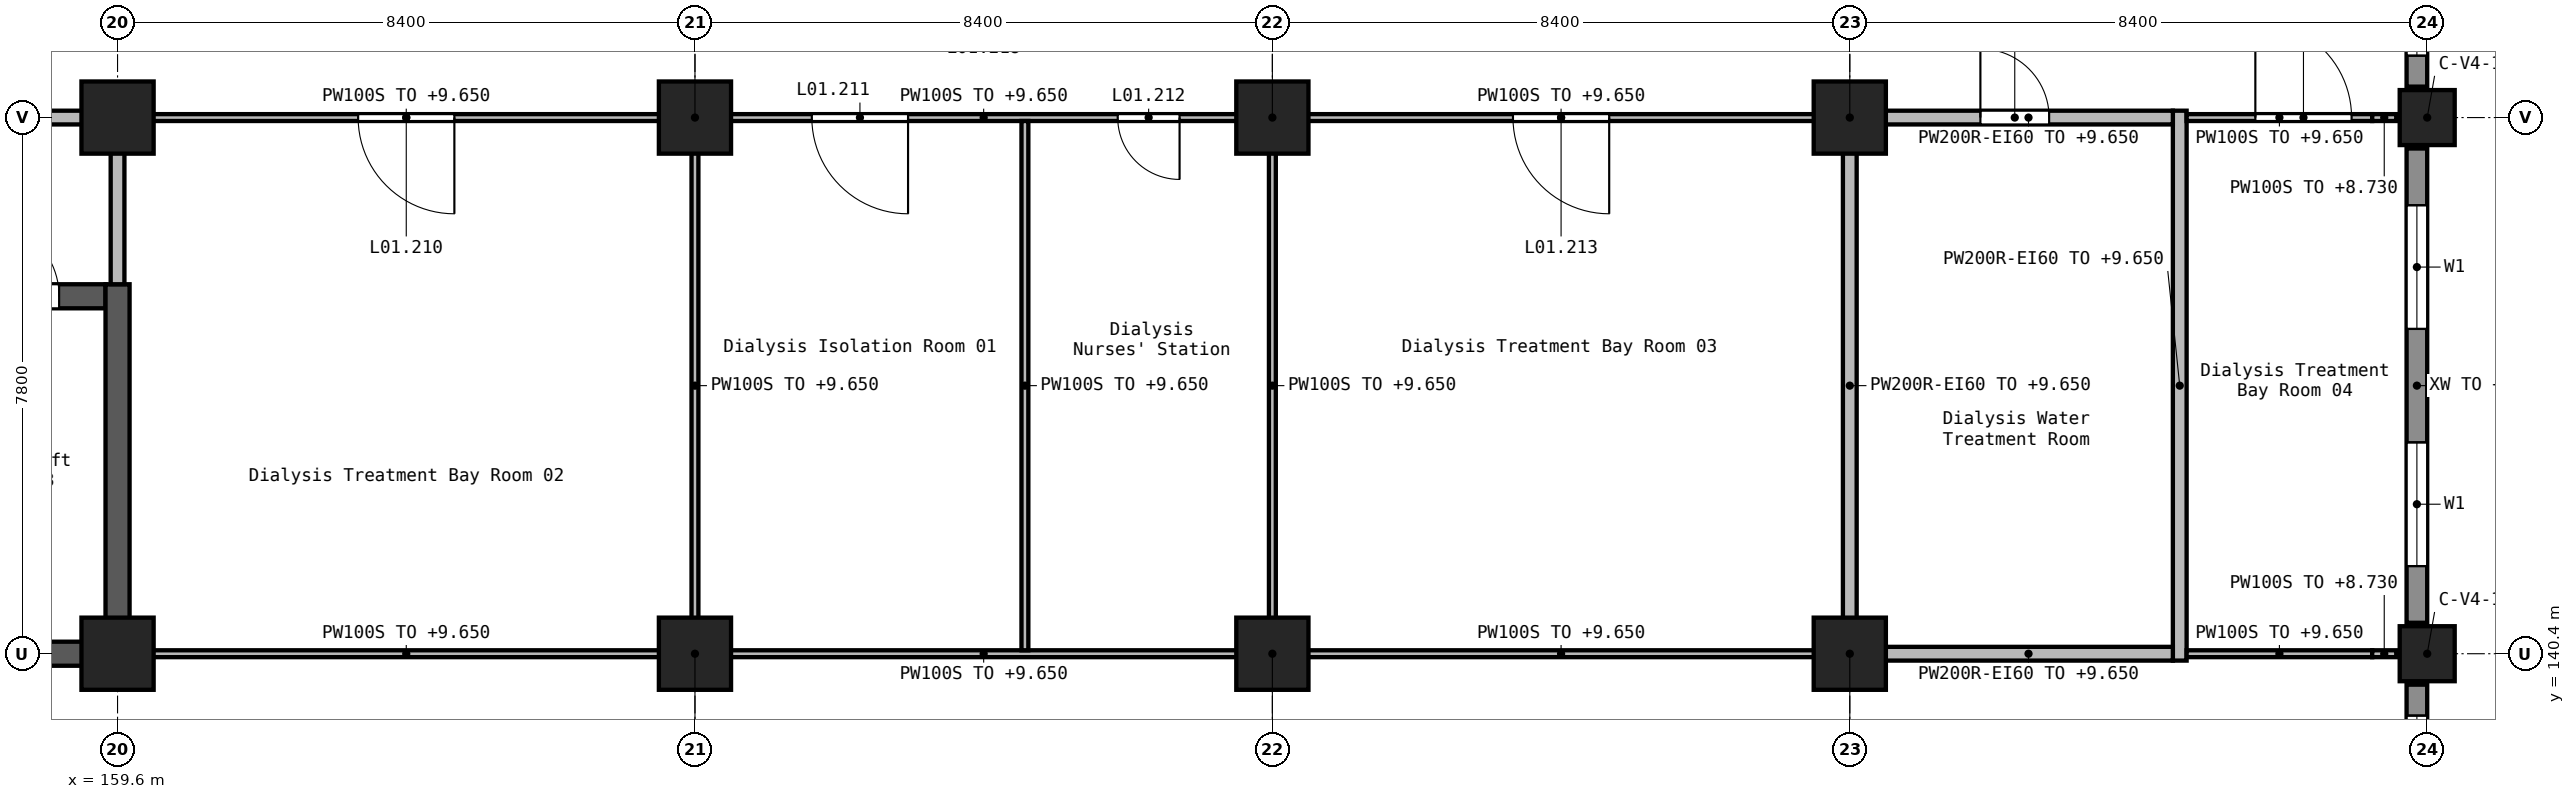
"""IFC4 building model, lengths in metres.
Left out: names, types, materials, properties, quantities, classifications, styles, units other than length and angle.
Written with IfcOpenShell. Run it as: python <this file> out.ifc"""

import sys

from ifc_helpers import new_model, si_unit, direction, frame, frame_2d, origin, origin_2d, place, context, subcontext, project, spatial, rectangle, extrude, element, fill, save


model = new_model("IFC4")
c1 = context("Model", 3, precision=1e-05, world=origin(), true_north=direction((0.0, 1.0)))
c2 = subcontext(c1, "Body", "Model", "MODEL_VIEW")
j1 = project(units=[si_unit("LENGTHUNIT", "METRE"), si_unit("PLANEANGLEUNIT", "RADIAN")], contexts=[c1])
p1 = place(None, origin())
s1 = spatial("IfcSite", under=j1, at=p1, CompositionType="ELEMENT")
p2 = place(p1, origin())
s2 = spatial("IfcBuilding", under=s1, at=p2, CompositionType="ELEMENT")
p3 = place(p2, frame((0.0, 0.0, 5.4)))
s3 = spatial("IfcBuildingStorey", under=s2, at=p3, CompositionType="ELEMENT", Elevation=5.4)
for number, where, z_axis, x_axis in (
    (1, (159.6, 140.4, 0.0), (0.0, 0.0, 1.0), (1.0, 0.0, 0.0)),
    (2, (159.6, 148.2, 0.0), (0.0, 0.0, 1.0), (1.0, 0.0, 0.0)),
    (3, (168.0, 140.4, 0.0), (0.0, 0.0, 1.0), (1.0, 0.0, 0.0)),
    (4, (168.0, 148.2, 0.0), (0.0, 0.0, 1.0), (1.0, 0.0, 0.0)),
    (5, (176.4, 140.4, 0.0), (0.0, 0.0, 1.0), (1.0, 0.0, 0.0)),
    (6, (176.4, 148.2, 0.0), (0.0, 0.0, 1.0), (1.0, 0.0, 0.0)),
    (7, (184.8, 140.4, 0.0), (0.0, 0.0, 1.0), (1.0, 0.0, 0.0)),
    (8, (184.8, 148.2, 0.0), (0.0, 0.0, 1.0), (1.0, 0.0, 0.0)),
):
    element("IfcColumn", number, at=place(p3, frame(where, z_axis=z_axis, x_axis=x_axis)), inside=s3, PredefinedType="COLUMN", context=c2, shape_type="SweptSolid", body=[
        extrude(rectangle(XDim=1.05, YDim=1.05, at=origin_2d()), origin(), (0.0, 0.0, 1.0), 4.5),
    ])
for number, where, z_axis, x_axis in (
    (9, (193.2, 140.4, 0.0), (0.0, 0.0, 1.0), (1.0, 0.0, 0.0)),
    (10, (193.2, 148.2, 0.0), (0.0, 0.0, 1.0), (1.0, 0.0, 0.0)),
):
    element("IfcColumn", number, at=place(p3, frame(where, z_axis=z_axis, x_axis=x_axis)), inside=s3, PredefinedType="COLUMN", context=c2, shape_type="SweptSolid", body=[
        extrude(rectangle(XDim=0.8, YDim=0.8, at=origin_2d()), origin(), (0.0, 0.0, 1.0), 4.5),
    ])
p4 = place(p3, frame((156.8, 140.4, 0.0), z_axis=(0.0, 0.0, 1.0), x_axis=(1.0, 0.0, 0.0)))
e11 = element("IfcWall", 11, at=p4, inside=s3, PredefinedType="SHEAR", context=c2, shape_type="SweptSolid", body=[
    extrude(rectangle(XDim=2.625, YDim=0.35, at=frame_2d((1.312, 0.0))), origin(), (0.0, 0.0, 1.0), 4.5),
])
p5 = place(p3, frame((156.8, 145.6, 0.0), z_axis=(0.0, 0.0, 1.0), x_axis=(1.0, 0.0, 0.0)))
e12 = element("IfcWall", 12, at=p5, inside=s3, PredefinedType="SHEAR", context=c2, shape_type="SweptSolid", body=[
    extrude(rectangle(XDim=2.625, YDim=0.35, at=frame_2d((1.312, 0.0))), origin(), (0.0, 0.0, 1.0), 4.5),
])
p6 = place(p5, frame((0.85, 0.0, 0.0)))
e13 = element("IfcOpeningElement", 13, at=p6, cuts=e12, PredefinedType="OPENING", context=c2, shape_type="SweptSolid", body=[
    extrude(rectangle(XDim=1.1, YDim=2.1, at=frame_2d((0.55, 1.05))), frame((0.0, 0.185, 0.0), z_axis=(0.0, -1.0, 0.0), x_axis=(1.0, 0.0, 0.0)), (0.0, 0.0, 1.0), 0.37),
])
p7 = place(p3, frame((159.6, 140.225, 0.0), z_axis=(0.0, 0.0, 1.0), x_axis=(0.0, 1.0, 0.0)))
e14 = element("IfcWall", 14, at=p7, inside=s3, PredefinedType="SHEAR", context=c2, shape_type="SweptSolid", body=[
    extrude(rectangle(XDim=5.55, YDim=0.35, at=frame_2d((2.775, 0.0))), origin(), (0.0, 0.0, 1.0), 4.5),
])
p8 = place(p3, frame((193.05, 137.25, 0.0), z_axis=(0.0, 0.0, 1.0), x_axis=(0.0, 1.0, 0.0)))
e15 = element("IfcWall", 15, at=p8, inside=s3, PredefinedType="STANDARD", context=c2, shape_type="SweptSolid", body=[
    extrude(rectangle(XDim=2.7, YDim=0.3, at=frame_2d((1.35, 0.0))), origin(), (0.0, 0.0, 1.0), 3.35),
])
p9 = place(p8, frame((0.45, 0.0, 0.9)))
e16 = element("IfcOpeningElement", 16, at=p9, cuts=e15, PredefinedType="OPENING", context=c2, shape_type="SweptSolid", body=[
    extrude(rectangle(XDim=1.8, YDim=1.5, at=frame_2d((0.9, 0.75))), frame((0.0, 0.16, 0.0), z_axis=(0.0, -1.0, 0.0), x_axis=(1.0, 0.0, 0.0)), (0.0, 0.0, 1.0), 0.32),
])
p10 = place(p3, frame((193.05, 140.85, 0.0), z_axis=(0.0, 0.0, 1.0), x_axis=(0.0, 1.0, 0.0)))
e17 = element("IfcWall", 17, at=p10, inside=s3, PredefinedType="STANDARD", context=c2, shape_type="SweptSolid", body=[
    extrude(rectangle(XDim=6.9, YDim=0.3, at=frame_2d((3.45, 0.0))), origin(), (0.0, 0.0, 1.0), 3.35),
])
p11 = place(p10, frame((0.825, 0.0, 0.9)))
e18 = element("IfcOpeningElement", 18, at=p11, cuts=e17, PredefinedType="OPENING", context=c2, shape_type="SweptSolid", body=[
    extrude(rectangle(XDim=1.8, YDim=1.5, at=frame_2d((0.9, 0.75))), frame((0.0, 0.16, 0.0), z_axis=(0.0, -1.0, 0.0), x_axis=(1.0, 0.0, 0.0)), (0.0, 0.0, 1.0), 0.32),
])
p12 = place(p10, frame((4.275, 0.0, 0.9)))
e19 = element("IfcOpeningElement", 19, at=p12, cuts=e17, PredefinedType="OPENING", context=c2, shape_type="SweptSolid", body=[
    extrude(rectangle(XDim=1.8, YDim=1.5, at=frame_2d((0.9, 0.75))), frame((0.0, 0.16, 0.0), z_axis=(0.0, -1.0, 0.0), x_axis=(1.0, 0.0, 0.0)), (0.0, 0.0, 1.0), 0.32),
])
p13 = place(p3, frame((193.05, 148.65, 0.0), z_axis=(0.0, 0.0, 1.0), x_axis=(0.0, 1.0, 0.0)))
e20 = element("IfcWall", 20, at=p13, inside=s3, PredefinedType="STANDARD", context=c2, shape_type="SweptSolid", body=[
    extrude(rectangle(XDim=2.7, YDim=0.3, at=frame_2d((1.35, 0.0))), origin(), (0.0, 0.0, 1.0), 3.35),
])
p14 = place(p13, frame((0.45, 0.0, 0.9)))
e21 = element("IfcOpeningElement", 21, at=p14, cuts=e20, PredefinedType="OPENING", context=c2, shape_type="SweptSolid", body=[
    extrude(rectangle(XDim=1.8, YDim=1.5, at=frame_2d((0.9, 0.75))), frame((0.0, 0.16, 0.0), z_axis=(0.0, -1.0, 0.0), x_axis=(1.0, 0.0, 0.0)), (0.0, 0.0, 1.0), 0.32),
])
p15 = place(p3, frame((151.7, 148.2, 0.0), z_axis=(0.0, 0.0, 1.0), x_axis=(1.0, 0.0, 0.0)))
e22 = element("IfcWall", 22, at=p15, inside=s3, PredefinedType="SOLIDWALL", context=c2, shape_type="SweptSolid", body=[
    extrude(rectangle(XDim=7.4, YDim=0.2, at=frame_2d((3.7, 0.0))), origin(), (0.0, 0.0, 1.0), 4.25),
])
p16 = place(p15, frame((2.8, 0.0, 0.0)))
e23 = element("IfcOpeningElement", 23, at=p16, cuts=e22, PredefinedType="OPENING", context=c2, shape_type="SweptSolid", body=[
    extrude(rectangle(XDim=1.8, YDim=2.1, at=frame_2d((0.9, 1.05))), frame((0.0, 0.11, 0.0), z_axis=(0.0, -1.0, 0.0), x_axis=(1.0, 0.0, 0.0)), (0.0, 0.0, 1.0), 0.22),
])
p17 = place(p3, frame((184.8, 140.9, 0.0), z_axis=(0.0, 0.0, 1.0), x_axis=(0.0, 1.0, 0.0)))
e24 = element("IfcWall", 24, at=p17, inside=s3, PredefinedType="SOLIDWALL", context=c2, shape_type="SweptSolid", body=[
    extrude(rectangle(XDim=6.8, YDim=0.2, at=frame_2d((3.4, 0.0))), origin(), (0.0, 0.0, 1.0), 4.25),
])
p18 = place(p3, frame((189.6, 140.3, 0.0), z_axis=(0.0, 0.0, 1.0), x_axis=(0.0, 1.0, 0.0)))
e25 = element("IfcWall", 25, at=p18, inside=s3, PredefinedType="SOLIDWALL", context=c2, shape_type="SweptSolid", body=[
    extrude(rectangle(XDim=8.0, YDim=0.2, at=frame_2d((4.0, 0.0))), origin(), (0.0, 0.0, 1.0), 4.25),
])
p19 = place(p3, frame((185.3, 140.4, 0.0), z_axis=(0.0, 0.0, 1.0), x_axis=(1.0, 0.0, 0.0)))
e26 = element("IfcWall", 26, at=p19, inside=s3, PredefinedType="SOLIDWALL", context=c2, shape_type="SweptSolid", body=[
    extrude(rectangle(XDim=4.2, YDim=0.2, at=frame_2d((2.1, 0.0))), origin(), (0.0, 0.0, 1.0), 4.25),
])
p20 = place(p3, frame((185.3, 148.2, 0.0), z_axis=(0.0, 0.0, 1.0), x_axis=(1.0, 0.0, 0.0)))
e27 = element("IfcWall", 27, at=p20, inside=s3, PredefinedType="SOLIDWALL", context=c2, shape_type="SweptSolid", body=[
    extrude(rectangle(XDim=4.2, YDim=0.2, at=frame_2d((2.1, 0.0))), origin(), (0.0, 0.0, 1.0), 4.25),
])
p21 = place(p20, frame((1.4, 0.0, 0.0)))
e28 = element("IfcOpeningElement", 28, at=p21, cuts=e27, PredefinedType="OPENING", context=c2, shape_type="SweptSolid", body=[
    extrude(rectangle(XDim=1.0, YDim=2.1, at=frame_2d((0.5, 1.05))), frame((0.0, 0.11, 0.0), z_axis=(0.0, -1.0, 0.0), x_axis=(1.0, 0.0, 0.0)), (0.0, 0.0, 1.0), 0.22),
])
p22 = place(p3, frame((159.6, 145.775, 0.0), z_axis=(0.0, 0.0, 1.0), x_axis=(0.0, 1.0, 0.0)))
e29 = element("IfcWall", 29, at=p22, inside=s3, PredefinedType="SOLIDWALL", context=c2, shape_type="SweptSolid", body=[
    extrude(rectangle(XDim=1.925, YDim=0.2, at=frame_2d((0.962, 0.0))), origin(), (0.0, 0.0, 1.0), 4.25),
])
p23 = place(p3, frame((184.3, 140.4, 0.0), z_axis=(0.0, 0.0, 1.0), x_axis=(-1.0, 0.0, 0.0)))
e30 = element("IfcWall", 30, at=p23, inside=s3, PredefinedType="PARTITIONING", context=c2, shape_type="SweptSolid", body=[
    extrude(rectangle(XDim=7.4, YDim=0.1, at=frame_2d((3.7, 0.0))), origin(), (0.0, 0.0, 1.0), 4.25),
])
for number, where, z_axis, x_axis in (
    (31, (175.9, 140.4, 0.0), (0.0, 0.0, 1.0), (-1.0, 0.0, 0.0)),
    (32, (167.5, 140.4, 0.0), (0.0, 0.0, 1.0), (-1.0, 0.0, 0.0)),
):
    element("IfcWall", number, at=place(p3, frame(where, z_axis=z_axis, x_axis=x_axis)), inside=s3, PredefinedType="PARTITIONING", context=c2, shape_type="SweptSolid", body=[
        extrude(rectangle(XDim=7.4, YDim=0.1, at=frame_2d((3.7, 0.0))), origin(), (0.0, 0.0, 1.0), 4.25),
    ])
p24 = place(p3, frame((184.3, 148.2, 0.0), z_axis=(0.0, 0.0, 1.0), x_axis=(-1.0, 0.0, 0.0)))
e33 = element("IfcWall", 33, at=p24, inside=s3, PredefinedType="PARTITIONING", context=c2, shape_type="SweptSolid", body=[
    extrude(rectangle(XDim=7.4, YDim=0.1, at=frame_2d((3.7, 0.0))), origin(), (0.0, 0.0, 1.0), 4.25),
])
p25 = place(p24, frame((3.0, 0.0, 0.0)))
e34 = element("IfcOpeningElement", 34, at=p25, cuts=e33, PredefinedType="OPENING", context=c2, shape_type="SweptSolid", body=[
    extrude(rectangle(XDim=1.4, YDim=2.1, at=frame_2d((0.7, 1.05))), frame((0.0, 0.06, 0.0), z_axis=(0.0, -1.0, 0.0), x_axis=(1.0, 0.0, 0.0)), (0.0, 0.0, 1.0), 0.12),
])
p26 = place(p3, frame((175.9, 148.2, 0.0), z_axis=(0.0, 0.0, 1.0), x_axis=(-1.0, 0.0, 0.0)))
e35 = element("IfcWall", 35, at=p26, inside=s3, PredefinedType="PARTITIONING", context=c2, shape_type="SweptSolid", body=[
    extrude(rectangle(XDim=7.4, YDim=0.1, at=frame_2d((3.7, 0.0))), origin(), (0.0, 0.0, 1.0), 4.25),
])
p27 = place(p26, frame((4.8, 0.0, 0.0)))
e36 = element("IfcOpeningElement", 36, at=p27, cuts=e35, PredefinedType="OPENING", context=c2, shape_type="SweptSolid", body=[
    extrude(rectangle(XDim=1.4, YDim=2.1, at=frame_2d((0.7, 1.05))), frame((0.0, 0.06, 0.0), z_axis=(0.0, -1.0, 0.0), x_axis=(1.0, 0.0, 0.0)), (0.0, 0.0, 1.0), 0.12),
])
p28 = place(p26, frame((0.85, 0.0, 0.0)))
e37 = element("IfcOpeningElement", 37, at=p28, cuts=e35, PredefinedType="OPENING", context=c2, shape_type="SweptSolid", body=[
    extrude(rectangle(XDim=0.9, YDim=2.1, at=frame_2d((0.45, 1.05))), frame((0.0, 0.06, 0.0), z_axis=(0.0, -1.0, 0.0), x_axis=(1.0, 0.0, 0.0)), (0.0, 0.0, 1.0), 0.12),
])
p29 = place(p3, frame((167.5, 148.2, 0.0), z_axis=(0.0, 0.0, 1.0), x_axis=(-1.0, 0.0, 0.0)))
e38 = element("IfcWall", 38, at=p29, inside=s3, PredefinedType="PARTITIONING", context=c2, shape_type="SweptSolid", body=[
    extrude(rectangle(XDim=7.4, YDim=0.1, at=frame_2d((3.7, 0.0))), origin(), (0.0, 0.0, 1.0), 4.25),
])
p30 = place(p29, frame((3.0, 0.0, 0.0)))
e39 = element("IfcOpeningElement", 39, at=p30, cuts=e38, PredefinedType="OPENING", context=c2, shape_type="SweptSolid", body=[
    extrude(rectangle(XDim=1.4, YDim=2.1, at=frame_2d((0.7, 1.05))), frame((0.0, 0.06, 0.0), z_axis=(0.0, -1.0, 0.0), x_axis=(1.0, 0.0, 0.0)), (0.0, 0.0, 1.0), 0.12),
])
p31 = place(p3, frame((168.0, 140.9, 0.0), z_axis=(0.0, 0.0, 1.0), x_axis=(0.0, 1.0, 0.0)))
e40 = element("IfcWall", 40, at=p31, inside=s3, PredefinedType="PARTITIONING", context=c2, shape_type="SweptSolid", body=[
    extrude(rectangle(XDim=6.8, YDim=0.1, at=frame_2d((3.4, 0.0))), origin(), (0.0, 0.0, 1.0), 4.25),
])
p32 = place(p3, frame((172.8, 140.45, 0.0), z_axis=(0.0, 0.0, 1.0), x_axis=(0.0, 1.0, 0.0)))
e41 = element("IfcWall", 41, at=p32, inside=s3, PredefinedType="PARTITIONING", context=c2, shape_type="SweptSolid", body=[
    extrude(rectangle(XDim=7.7, YDim=0.1, at=frame_2d((3.85, 0.0))), origin(), (0.0, 0.0, 1.0), 4.25),
])
p33 = place(p3, frame((176.4, 140.9, 0.0), z_axis=(0.0, 0.0, 1.0), x_axis=(0.0, 1.0, 0.0)))
e42 = element("IfcWall", 42, at=p33, inside=s3, PredefinedType="PARTITIONING", context=c2, shape_type="SweptSolid", body=[
    extrude(rectangle(XDim=6.8, YDim=0.1, at=frame_2d((3.4, 0.0))), origin(), (0.0, 0.0, 1.0), 4.25),
])
p34 = place(p3, frame((189.7, 140.4, 0.0), z_axis=(0.0, 0.0, 1.0), x_axis=(1.0, 0.0, 0.0)))
e43 = element("IfcWall", 43, at=p34, inside=s3, PredefinedType="PARTITIONING", context=c2, shape_type="SweptSolid", body=[
    extrude(rectangle(XDim=2.7, YDim=0.1, at=frame_2d((1.35, 0.0))), origin(), (0.0, 0.0, 1.0), 4.25),
])
p35 = place(p3, frame((192.4, 140.4, 0.0), z_axis=(0.0, 0.0, 1.0), x_axis=(1.0, 0.0, 0.0)))
e44 = element("IfcWall", 44, at=p35, inside=s3, PredefinedType="PARTITIONING", context=c2, shape_type="SweptSolid", body=[
    extrude(rectangle(XDim=0.35, YDim=0.1, at=frame_2d((0.175, 0.0))), origin(), (0.0, 0.0, 1.0), 3.33),
])
p36 = place(p3, frame((189.7, 148.2, 0.0), z_axis=(0.0, 0.0, 1.0), x_axis=(1.0, 0.0, 0.0)))
e45 = element("IfcWall", 45, at=p36, inside=s3, PredefinedType="PARTITIONING", context=c2, shape_type="SweptSolid", body=[
    extrude(rectangle(XDim=2.7, YDim=0.1, at=frame_2d((1.35, 0.0))), origin(), (0.0, 0.0, 1.0), 4.25),
])
p37 = place(p36, frame((1.0, 0.0, 0.0)))
e46 = element("IfcOpeningElement", 46, at=p37, cuts=e45, PredefinedType="OPENING", context=c2, shape_type="SweptSolid", body=[
    extrude(rectangle(XDim=1.4, YDim=2.1, at=frame_2d((0.7, 1.05))), frame((0.0, 0.06, 0.0), z_axis=(0.0, -1.0, 0.0), x_axis=(1.0, 0.0, 0.0)), (0.0, 0.0, 1.0), 0.12),
])
p38 = place(p3, frame((192.4, 148.2, 0.0), z_axis=(0.0, 0.0, 1.0), x_axis=(1.0, 0.0, 0.0)))
e47 = element("IfcWall", 47, at=p38, inside=s3, PredefinedType="PARTITIONING", context=c2, shape_type="SweptSolid", body=[
    extrude(rectangle(XDim=0.35, YDim=0.1, at=frame_2d((0.175, 0.0))), origin(), (0.0, 0.0, 1.0), 3.33),
])
p39 = place(p9, origin())
e48 = element("IfcWindow", 48, at=p39, inside=s3, PartitioningType="SINGLE_PANEL", PredefinedType="WINDOW", context=c2, shape_type="SweptSolid", body=[
    extrude(rectangle(XDim=1.8, YDim=1.5, at=frame_2d((0.9, 0.75))), frame((0.0, 0.03, 0.0), z_axis=(0.0, -1.0, 0.0), x_axis=(1.0, 0.0, 0.0)), (0.0, 0.0, 1.0), 0.06),
])
fill(e16, e48)
p40 = place(p11, origin())
e49 = element("IfcWindow", 49, at=p40, inside=s3, PartitioningType="SINGLE_PANEL", PredefinedType="WINDOW", context=c2, shape_type="SweptSolid", body=[
    extrude(rectangle(XDim=1.8, YDim=1.5, at=frame_2d((0.9, 0.75))), frame((0.0, 0.03, 0.0), z_axis=(0.0, -1.0, 0.0), x_axis=(1.0, 0.0, 0.0)), (0.0, 0.0, 1.0), 0.06),
])
fill(e18, e49)
p41 = place(p12, origin())
e50 = element("IfcWindow", 50, at=p41, inside=s3, PartitioningType="SINGLE_PANEL", PredefinedType="WINDOW", context=c2, shape_type="SweptSolid", body=[
    extrude(rectangle(XDim=1.8, YDim=1.5, at=frame_2d((0.9, 0.75))), frame((0.0, 0.03, 0.0), z_axis=(0.0, -1.0, 0.0), x_axis=(1.0, 0.0, 0.0)), (0.0, 0.0, 1.0), 0.06),
])
fill(e19, e50)
p42 = place(p14, origin())
e51 = element("IfcWindow", 51, at=p42, inside=s3, PartitioningType="SINGLE_PANEL", PredefinedType="WINDOW", context=c2, shape_type="SweptSolid", body=[
    extrude(rectangle(XDim=1.8, YDim=1.5, at=frame_2d((0.9, 0.75))), frame((0.0, 0.03, 0.0), z_axis=(0.0, -1.0, 0.0), x_axis=(1.0, 0.0, 0.0)), (0.0, 0.0, 1.0), 0.06),
])
fill(e21, e51)
p43 = place(p30, origin())
e52 = element("IfcDoor", 52, at=p43, inside=s3, OperationType="DOUBLE_DOOR_SINGLE_SWING", PredefinedType="DOOR", context=c2, shape_type="SweptSolid", body=[
    extrude(rectangle(XDim=1.4, YDim=2.1, at=frame_2d((0.7, 1.05))), frame((0.0, 0.025, 0.0), z_axis=(0.0, -1.0, 0.0), x_axis=(1.0, 0.0, 0.0)), (0.0, 0.0, 1.0), 0.05),
])
fill(e39, e52)
p44 = place(p27, origin())
e53 = element("IfcDoor", 53, at=p44, inside=s3, OperationType="DOUBLE_DOOR_SINGLE_SWING", PredefinedType="DOOR", context=c2, shape_type="SweptSolid", body=[
    extrude(rectangle(XDim=1.4, YDim=2.1, at=frame_2d((0.7, 1.05))), frame((0.0, 0.025, 0.0), z_axis=(0.0, -1.0, 0.0), x_axis=(1.0, 0.0, 0.0)), (0.0, 0.0, 1.0), 0.05),
])
fill(e36, e53)
p45 = place(p28, origin())
e54 = element("IfcDoor", 54, at=p45, inside=s3, OperationType="SINGLE_SWING_LEFT", PredefinedType="DOOR", context=c2, shape_type="SweptSolid", body=[
    extrude(rectangle(XDim=0.9, YDim=2.1, at=frame_2d((0.45, 1.05))), frame((0.0, 0.025, 0.0), z_axis=(0.0, -1.0, 0.0), x_axis=(1.0, 0.0, 0.0)), (0.0, 0.0, 1.0), 0.05),
])
fill(e37, e54)
p46 = place(p25, origin())
e55 = element("IfcDoor", 55, at=p46, inside=s3, OperationType="DOUBLE_DOOR_SINGLE_SWING", PredefinedType="DOOR", context=c2, shape_type="SweptSolid", body=[
    extrude(rectangle(XDim=1.4, YDim=2.1, at=frame_2d((0.7, 1.05))), frame((0.0, 0.025, 0.0), z_axis=(0.0, -1.0, 0.0), x_axis=(1.0, 0.0, 0.0)), (0.0, 0.0, 1.0), 0.05),
])
fill(e34, e55)
p47 = place(p21, frame((1.0, 0.0, 0.0), z_axis=(0.0, 0.0, 1.0), x_axis=(-1.0, 0.0, 0.0)))
e56 = element("IfcDoor", 56, at=p47, inside=s3, OperationType="SINGLE_SWING_RIGHT", PredefinedType="DOOR", context=c2, shape_type="SweptSolid", body=[
    extrude(rectangle(XDim=1.0, YDim=2.1, at=frame_2d((0.5, 1.05))), frame((0.0, 0.025, 0.0), z_axis=(0.0, -1.0, 0.0), x_axis=(1.0, 0.0, 0.0)), (0.0, 0.0, 1.0), 0.05),
])
fill(e28, e56)
p48 = place(p37, frame((1.4, 0.0, 0.0), z_axis=(0.0, 0.0, 1.0), x_axis=(-1.0, 0.0, 0.0)))
e57 = element("IfcDoor", 57, at=p48, inside=s3, OperationType="DOUBLE_DOOR_SINGLE_SWING", PredefinedType="DOOR", context=c2, shape_type="SweptSolid", body=[
    extrude(rectangle(XDim=1.4, YDim=2.1, at=frame_2d((0.7, 1.05))), frame((0.0, 0.025, 0.0), z_axis=(0.0, -1.0, 0.0), x_axis=(1.0, 0.0, 0.0)), (0.0, 0.0, 1.0), 0.05),
])
fill(e46, e57)
p49 = place(p6, origin())
e58 = element("IfcDoor", 58, at=p49, inside=s3, OperationType="DOUBLE_DOOR_SLIDING", PredefinedType="DOOR", context=c2, shape_type="SweptSolid", body=[
    extrude(rectangle(XDim=1.1, YDim=2.1, at=frame_2d((0.55, 1.05))), frame((0.0, 0.025, 0.0), z_axis=(0.0, -1.0, 0.0), x_axis=(1.0, 0.0, 0.0)), (0.0, 0.0, 1.0), 0.05),
])
fill(e13, e58)
save(model, sys.argv[1])
